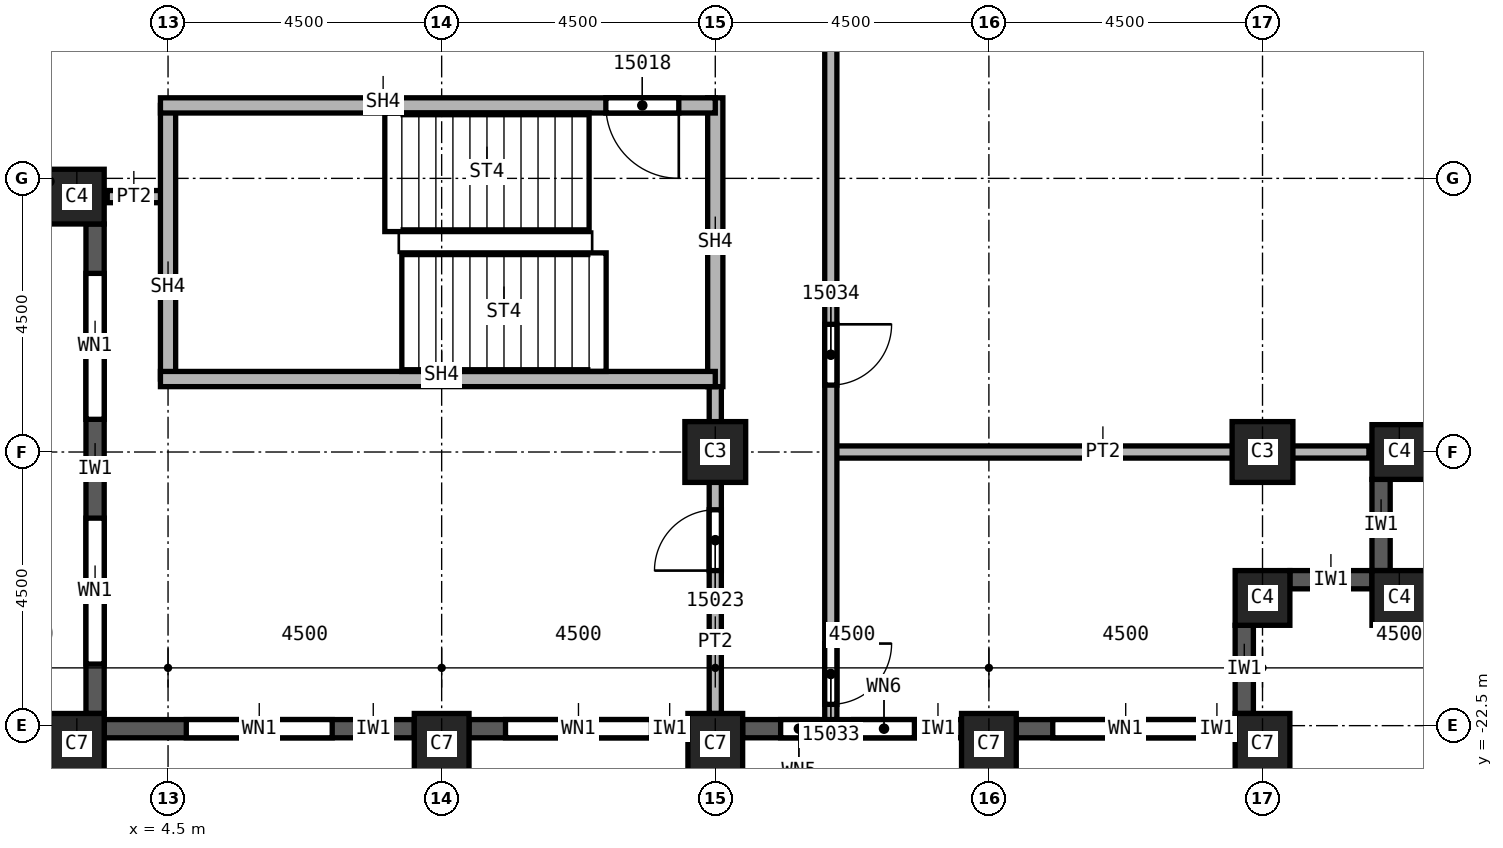
"""IFC4 building model, lengths in metres.
Left out: names, types, materials, properties, quantities, classifications, styles, units other than length and angle.
Written with IfcOpenShell. Run it as: python <this file> out.ifc"""

import sys

from ifc_helpers import new_model, si_unit, direction, frame, frame_2d, origin, origin_2d, place, context, subcontext, project, spatial, rectangle, extrude, element, fill, save


model = new_model("IFC4")
c1 = context("Model", 3, precision=1e-05, world=origin(), true_north=direction((0.0, 1.0)))
c2 = subcontext(c1, "Body", "Model", "MODEL_VIEW")
j1 = project(units=[si_unit("LENGTHUNIT", "METRE"), si_unit("PLANEANGLEUNIT", "RADIAN")], contexts=[c1])
p1 = place(None, origin())
s1 = spatial("IfcSite", under=j1, at=p1, CompositionType="ELEMENT")
p2 = place(p1, origin())
s2 = spatial("IfcBuilding", under=s1, at=p2, CompositionType="ELEMENT")
p3 = place(p2, frame((0.0, 0.0, 228.0)))
s3 = spatial("IfcBuildingStorey", under=s2, at=p3, CompositionType="ELEMENT", Elevation=228.0)
for number, where, z_axis, x_axis in (
    (1, (13.5, -18.0, 0.0), (0.0, 0.0, 1.0), (1.0, 0.0, 0.0)),
    (2, (22.5, -18.0, 0.0), (0.0, 0.0, 1.0), (1.0, 0.0, 0.0)),
):
    element("IfcColumn", number, at=place(p3, frame(where, z_axis=z_axis, x_axis=x_axis)), inside=s3, PredefinedType="COLUMN", context=c2, shape_type="SweptSolid", body=[
        extrude(rectangle(XDim=1.0, YDim=1.0, at=origin_2d()), origin(), (0.0, 0.0, 1.0), 3.72),
    ])
for number, where, z_axis, x_axis in (
    (3, (3.0, -22.8, 0.0), (0.0, 0.0, 1.0), (1.0, 0.0, 0.0)),
    (4, (9.0, -22.8, 0.0), (0.0, 0.0, 1.0), (1.0, 0.0, 0.0)),
    (5, (13.5, -22.8, 0.0), (0.0, 0.0, 1.0), (1.0, 0.0, 0.0)),
    (6, (18.0, -22.8, 0.0), (0.0, 0.0, 1.0), (1.0, 0.0, 0.0)),
    (7, (22.5, -22.8, 0.0), (0.0, 0.0, 1.0), (1.0, 0.0, 0.0)),
):
    element("IfcColumn", number, at=place(p3, frame(where, z_axis=z_axis, x_axis=x_axis)), inside=s3, PredefinedType="COLUMN", context=c2, shape_type="SweptSolid", body=[
        extrude(rectangle(XDim=0.9, YDim=1.0, at=origin_2d()), origin(), (0.0, 0.0, 1.0), 3.72),
    ])
for number, where, z_axis, x_axis in (
    (8, (3.0, -13.8, 0.0), (0.0, 0.0, 1.0), (1.0, 0.0, 0.0)),
    (9, (22.5, -20.4, 0.0), (0.0, 0.0, 1.0), (1.0, 0.0, 0.0)),
    (10, (24.75, -20.4, 0.0), (0.0, 0.0, 1.0), (1.0, 0.0, 0.0)),
    (11, (24.75, -18.0, 0.0), (0.0, 0.0, 1.0), (1.0, 0.0, 0.0)),
):
    element("IfcColumn", number, at=place(p3, frame(where, z_axis=z_axis, x_axis=x_axis)), inside=s3, PredefinedType="COLUMN", context=c2, shape_type="SweptSolid", body=[
        extrude(rectangle(XDim=0.9, YDim=0.9, at=origin_2d()), origin(), (0.0, 0.0, 1.0), 3.72),
    ])
p4 = place(p3, frame((3.3, -14.25, 0.0), z_axis=(0.0, 0.0, 1.0), x_axis=(0.0, -1.0, 0.0)))
e12 = element("IfcWall", 12, at=p4, inside=s3, PredefinedType="SOLIDWALL", context=c2, shape_type="SweptSolid", body=[
    extrude(rectangle(XDim=8.05, YDim=0.3, at=frame_2d((4.025, 0.0))), origin(), (0.0, 0.0, 1.0), 3.12),
])
p5 = place(p4, frame((0.812, 0.0, 0.8)))
e13 = element("IfcOpeningElement", 13, at=p5, cuts=e12, PredefinedType="OPENING", context=c2, shape_type="SweptSolid", body=[
    extrude(rectangle(XDim=2.4, YDim=1.95, at=frame_2d((1.2, 0.975))), frame((0.0, 0.15, 0.0), z_axis=(0.0, -1.0, 0.0), x_axis=(1.0, 0.0, 0.0)), (0.0, 0.0, 1.0), 0.3),
])
p6 = place(p4, frame((4.837, 0.0, 0.8)))
e14 = element("IfcOpeningElement", 14, at=p6, cuts=e12, PredefinedType="OPENING", context=c2, shape_type="SweptSolid", body=[
    extrude(rectangle(XDim=2.4, YDim=1.95, at=frame_2d((1.2, 0.975))), frame((0.0, 0.15, 0.0), z_axis=(0.0, -1.0, 0.0), x_axis=(1.0, 0.0, 0.0)), (0.0, 0.0, 1.0), 0.3),
])
p7 = place(p3, frame((3.45, -22.55, 0.0), z_axis=(0.0, 0.0, 1.0), x_axis=(1.0, 0.0, 0.0)))
e15 = element("IfcWall", 15, at=p7, inside=s3, PredefinedType="SOLIDWALL", context=c2, shape_type="SweptSolid", body=[
    extrude(rectangle(XDim=5.1, YDim=0.3, at=frame_2d((2.55, 0.0))), origin(), (0.0, 0.0, 1.0), 3.12),
])
p8 = place(p7, frame((1.35, 0.0, 0.8)))
e16 = element("IfcOpeningElement", 16, at=p8, cuts=e15, PredefinedType="OPENING", context=c2, shape_type="SweptSolid", body=[
    extrude(rectangle(XDim=2.4, YDim=1.95, at=frame_2d((1.2, 0.975))), frame((0.0, 0.15, 0.0), z_axis=(0.0, -1.0, 0.0), x_axis=(1.0, 0.0, 0.0)), (0.0, 0.0, 1.0), 0.3),
])
p9 = place(p3, frame((9.45, -22.55, 0.0), z_axis=(0.0, 0.0, 1.0), x_axis=(1.0, 0.0, 0.0)))
e17 = element("IfcWall", 17, at=p9, inside=s3, PredefinedType="SOLIDWALL", context=c2, shape_type="SweptSolid", body=[
    extrude(rectangle(XDim=3.6, YDim=0.3, at=frame_2d((1.8, 0.0))), origin(), (0.0, 0.0, 1.0), 3.12),
])
p10 = place(p9, frame((0.6, 0.0, 0.8)))
e18 = element("IfcOpeningElement", 18, at=p10, cuts=e17, PredefinedType="OPENING", context=c2, shape_type="SweptSolid", body=[
    extrude(rectangle(XDim=2.4, YDim=1.95, at=frame_2d((1.2, 0.975))), frame((0.0, 0.15, 0.0), z_axis=(0.0, -1.0, 0.0), x_axis=(1.0, 0.0, 0.0)), (0.0, 0.0, 1.0), 0.3),
])
p11 = place(p3, frame((13.95, -22.55, 0.0), z_axis=(0.0, 0.0, 1.0), x_axis=(1.0, 0.0, 0.0)))
e19 = element("IfcWall", 19, at=p11, inside=s3, PredefinedType="SOLIDWALL", context=c2, shape_type="SweptSolid", body=[
    extrude(rectangle(XDim=3.6, YDim=0.3, at=frame_2d((1.8, 0.0))), origin(), (0.0, 0.0, 1.0), 3.12),
])
p12 = place(p11, frame((0.625, 0.0, 0.8)))
e20 = element("IfcOpeningElement", 20, at=p12, cuts=e19, PredefinedType="OPENING", context=c2, shape_type="SweptSolid", body=[
    extrude(rectangle(XDim=0.6, YDim=1.95, at=frame_2d((0.3, 0.975))), frame((0.0, 0.15, 0.0), z_axis=(0.0, -1.0, 0.0), x_axis=(1.0, 0.0, 0.0)), (0.0, 0.0, 1.0), 0.3),
])
p13 = place(p11, frame((1.825, 0.0, 0.8)))
e21 = element("IfcOpeningElement", 21, at=p13, cuts=e19, PredefinedType="OPENING", context=c2, shape_type="SweptSolid", body=[
    extrude(rectangle(XDim=1.0, YDim=1.95, at=frame_2d((0.5, 0.975))), frame((0.0, 0.15, 0.0), z_axis=(0.0, -1.0, 0.0), x_axis=(1.0, 0.0, 0.0)), (0.0, 0.0, 1.0), 0.3),
])
p14 = place(p3, frame((18.45, -22.55, 0.0), z_axis=(0.0, 0.0, 1.0), x_axis=(1.0, 0.0, 0.0)))
e22 = element("IfcWall", 22, at=p14, inside=s3, PredefinedType="SOLIDWALL", context=c2, shape_type="SweptSolid", body=[
    extrude(rectangle(XDim=3.6, YDim=0.3, at=frame_2d((1.8, 0.0))), origin(), (0.0, 0.0, 1.0), 3.12),
])
p15 = place(p14, frame((0.6, 0.0, 0.8)))
e23 = element("IfcOpeningElement", 23, at=p15, cuts=e22, PredefinedType="OPENING", context=c2, shape_type="SweptSolid", body=[
    extrude(rectangle(XDim=2.4, YDim=1.95, at=frame_2d((1.2, 0.975))), frame((0.0, 0.15, 0.0), z_axis=(0.0, -1.0, 0.0), x_axis=(1.0, 0.0, 0.0)), (0.0, 0.0, 1.0), 0.3),
])
p16 = place(p3, frame((22.2, -22.3, 0.0), z_axis=(0.0, 0.0, 1.0), x_axis=(0.0, 1.0, 0.0)))
e24 = element("IfcWall", 24, at=p16, inside=s3, PredefinedType="SOLIDWALL", context=c2, shape_type="SweptSolid", body=[
    extrude(rectangle(XDim=1.45, YDim=0.3, at=frame_2d((0.725, 0.0))), origin(), (0.0, 0.0, 1.0), 3.12),
])
p17 = place(p3, frame((22.95, -20.1, 0.0), z_axis=(0.0, 0.0, 1.0), x_axis=(1.0, 0.0, 0.0)))
e25 = element("IfcWall", 25, at=p17, inside=s3, PredefinedType="SOLIDWALL", context=c2, shape_type="SweptSolid", body=[
    extrude(rectangle(XDim=1.35, YDim=0.3, at=frame_2d((0.675, 0.0))), origin(), (0.0, 0.0, 1.0), 3.12),
])
p18 = place(p3, frame((24.45, -19.95, 0.0), z_axis=(0.0, 0.0, 1.0), x_axis=(0.0, 1.0, 0.0)))
e26 = element("IfcWall", 26, at=p18, inside=s3, PredefinedType="SOLIDWALL", context=c2, shape_type="SweptSolid", body=[
    extrude(rectangle(XDim=1.5, YDim=0.3, at=frame_2d((0.75, 0.0))), origin(), (0.0, 0.0, 1.0), 3.12),
])
p19 = place(p3, frame((4.5, -13.8, 0.0), z_axis=(0.0, 0.0, 1.0), x_axis=(-1.0, 0.0, 0.0)))
e27 = element("IfcWall", 27, at=p19, inside=s3, PredefinedType="PARTITIONING", context=c2, shape_type="SweptSolid", body=[
    extrude(rectangle(XDim=1.0, YDim=0.2, at=frame_2d((0.5, 0.0))), origin(), (0.0, 0.0, 1.0), 3.72),
])
p20 = place(p3, frame((13.5, -22.3, 0.0), z_axis=(0.0, 0.0, 1.0), x_axis=(0.0, 1.0, 0.0)))
e28 = element("IfcWall", 28, at=p20, inside=s3, PredefinedType="PARTITIONING", context=c2, shape_type="SweptSolid", body=[
    extrude(rectangle(XDim=5.625, YDim=0.2, at=frame_2d((2.812, 0.0))), origin(), (0.0, 0.0, 1.0), 3.72),
])
p21 = place(p20, frame((2.35, 0.0, 0.0)))
e29 = element("IfcOpeningElement", 29, at=p21, cuts=e28, PredefinedType="OPENING", context=c2, shape_type="SweptSolid", body=[
    extrude(rectangle(XDim=1.0, YDim=2.1, at=frame_2d((0.5, 1.05))), frame((0.0, 0.1, 0.0), z_axis=(0.0, -1.0, 0.0), x_axis=(1.0, 0.0, 0.0)), (0.0, 0.0, 1.0), 0.2),
])
p22 = place(p3, frame((15.4, -18.0, 0.0), z_axis=(0.0, 0.0, 1.0), x_axis=(1.0, 0.0, 0.0)))
e30 = element("IfcWall", 30, at=p22, inside=s3, PredefinedType="PARTITIONING", context=c2, shape_type="SweptSolid", body=[
    extrude(rectangle(XDim=8.85, YDim=0.2, at=frame_2d((4.425, 0.0))), origin(), (0.0, 0.0, 1.0), 3.72),
])
p23 = place(p3, frame((15.4, 22.4, 0.0), z_axis=(0.0, 0.0, 1.0), x_axis=(0.0, -1.0, 0.0)))
e31 = element("IfcWall", 31, at=p23, inside=s3, PredefinedType="PARTITIONING", context=c2, shape_type="SweptSolid", body=[
    extrude(rectangle(XDim=44.8, YDim=0.2, at=frame_2d((22.4, 0.0))), origin(), (0.0, 0.0, 1.0), 3.72),
])
p24 = place(p23, frame((18.5, 0.0, 0.0)))
e32 = element("IfcOpeningElement", 32, at=p24, cuts=e31, PredefinedType="OPENING", context=c2, shape_type="SweptSolid", body=[
    extrude(rectangle(XDim=1.0, YDim=2.1, at=frame_2d((0.5, 1.05))), frame((0.0, 0.1, 0.0), z_axis=(0.0, -1.0, 0.0), x_axis=(1.0, 0.0, 0.0)), (0.0, 0.0, 1.0), 0.2),
])
p25 = place(p23, frame((9.95, 0.0, 0.0)))
e33 = element("IfcOpeningElement", 33, at=p25, cuts=e31, PredefinedType="OPENING", context=c2, shape_type="SweptSolid", body=[
    extrude(rectangle(XDim=1.0, YDim=2.1, at=frame_2d((0.5, 1.05))), frame((0.0, 0.1, 0.0), z_axis=(0.0, -1.0, 0.0), x_axis=(1.0, 0.0, 0.0)), (0.0, 0.0, 1.0), 0.2),
])
p26 = place(p23, frame((1.3, 0.0, 0.0)))
e34 = element("IfcOpeningElement", 34, at=p26, cuts=e31, PredefinedType="OPENING", context=c2, shape_type="SweptSolid", body=[
    extrude(rectangle(XDim=1.0, YDim=2.1, at=frame_2d((0.5, 1.05))), frame((0.0, 0.1, 0.0), z_axis=(0.0, -1.0, 0.0), x_axis=(1.0, 0.0, 0.0)), (0.0, 0.0, 1.0), 0.2),
])
p27 = place(p23, frame((43.55, 0.0, 0.0)))
e35 = element("IfcOpeningElement", 35, at=p27, cuts=e31, PredefinedType="OPENING", context=c2, shape_type="SweptSolid", body=[
    extrude(rectangle(XDim=1.0, YDim=2.1, at=frame_2d((0.5, 1.05))), frame((0.0, 0.1, 0.0), z_axis=(0.0, -1.0, 0.0), x_axis=(1.0, 0.0, 0.0)), (0.0, 0.0, 1.0), 0.2),
])
p28 = place(p23, frame((38.3, 0.0, 0.0)))
e36 = element("IfcOpeningElement", 36, at=p28, cuts=e31, PredefinedType="OPENING", context=c2, shape_type="SweptSolid", body=[
    extrude(rectangle(XDim=1.0, YDim=2.1, at=frame_2d((0.5, 1.05))), frame((0.0, 0.1, 0.0), z_axis=(0.0, -1.0, 0.0), x_axis=(1.0, 0.0, 0.0)), (0.0, 0.0, 1.0), 0.2),
])
p29 = place(p23, frame((30.65, 0.0, 0.0)))
e37 = element("IfcOpeningElement", 37, at=p29, cuts=e31, PredefinedType="OPENING", context=c2, shape_type="SweptSolid", body=[
    extrude(rectangle(XDim=1.0, YDim=2.1, at=frame_2d((0.5, 1.05))), frame((0.0, 0.1, 0.0), z_axis=(0.0, -1.0, 0.0), x_axis=(1.0, 0.0, 0.0)), (0.0, 0.0, 1.0), 0.2),
])
p30 = place(p23, frame((24.2, 0.0, 0.0)))
e38 = element("IfcOpeningElement", 38, at=p30, cuts=e31, PredefinedType="OPENING", context=c2, shape_type="SweptSolid", body=[
    extrude(rectangle(XDim=1.0, YDim=2.1, at=frame_2d((0.5, 1.05))), frame((0.0, 0.1, 0.0), z_axis=(0.0, -1.0, 0.0), x_axis=(1.0, 0.0, 0.0)), (0.0, 0.0, 1.0), 0.2),
])
p31 = place(p3, frame((4.5, -16.8, 0.0), z_axis=(0.0, 0.0, 1.0), x_axis=(0.0, 1.0, 0.0)))
e39 = element("IfcWall", 39, at=p31, inside=s3, PredefinedType="SOLIDWALL", context=c2, shape_type="SweptSolid", body=[
    extrude(rectangle(XDim=4.5, YDim=0.25, at=frame_2d((2.25, 0.0))), origin(), (0.0, 0.0, 1.0), 3.72),
])
p32 = place(p3, frame((13.5, -16.925, 0.0), z_axis=(0.0, 0.0, 1.0), x_axis=(0.0, 1.0, 0.0)))
e40 = element("IfcWall", 40, at=p32, inside=s3, PredefinedType="SOLIDWALL", context=c2, shape_type="SweptSolid", body=[
    extrude(rectangle(XDim=4.75, YDim=0.25, at=frame_2d((2.375, 0.0))), origin(), (0.0, 0.0, 1.0), 3.72),
])
p33 = place(p3, frame((13.5, -16.8, 0.0), z_axis=(0.0, 0.0, 1.0), x_axis=(-1.0, 0.0, 0.0)))
e41 = element("IfcWall", 41, at=p33, inside=s3, PredefinedType="SOLIDWALL", context=c2, shape_type="SweptSolid", body=[
    extrude(rectangle(XDim=9.125, YDim=0.25, at=frame_2d((4.562, 0.0))), origin(), (0.0, 0.0, 1.0), 3.72),
])
p34 = place(p3, frame((13.5, -12.3, 0.0), z_axis=(0.0, 0.0, 1.0), x_axis=(-1.0, 0.0, 0.0)))
e42 = element("IfcWall", 42, at=p34, inside=s3, PredefinedType="SOLIDWALL", context=c2, shape_type="SweptSolid", body=[
    extrude(rectangle(XDim=9.125, YDim=0.25, at=frame_2d((4.562, 0.0))), origin(), (0.0, 0.0, 1.0), 3.72),
])
p35 = place(p34, frame((0.6, 0.0, 0.0)))
e43 = element("IfcOpeningElement", 43, at=p35, cuts=e42, PredefinedType="OPENING", context=c2, shape_type="SweptSolid", body=[
    extrude(rectangle(XDim=1.2, YDim=2.1, at=frame_2d((0.6, 1.05))), frame((0.0, 0.125, 0.0), z_axis=(0.0, -1.0, 0.0), x_axis=(1.0, 0.0, 0.0)), (0.0, 0.0, 1.0), 0.25),
])
p36 = place(p5, origin())
e44 = element("IfcWindow", 44, at=p36, inside=s3, PartitioningType="SINGLE_PANEL", PredefinedType="WINDOW", context=c2, shape_type="SweptSolid", body=[
    extrude(rectangle(XDim=2.4, YDim=1.95, at=frame_2d((1.2, 0.975))), frame((0.0, 0.03, 0.0), z_axis=(0.0, -1.0, 0.0), x_axis=(1.0, 0.0, 0.0)), (0.0, 0.0, 1.0), 0.06),
])
fill(e13, e44)
p37 = place(p6, origin())
e45 = element("IfcWindow", 45, at=p37, inside=s3, PartitioningType="SINGLE_PANEL", PredefinedType="WINDOW", context=c2, shape_type="SweptSolid", body=[
    extrude(rectangle(XDim=2.4, YDim=1.95, at=frame_2d((1.2, 0.975))), frame((0.0, 0.03, 0.0), z_axis=(0.0, -1.0, 0.0), x_axis=(1.0, 0.0, 0.0)), (0.0, 0.0, 1.0), 0.06),
])
fill(e14, e45)
p38 = place(p8, origin())
e46 = element("IfcWindow", 46, at=p38, inside=s3, PartitioningType="SINGLE_PANEL", PredefinedType="WINDOW", context=c2, shape_type="SweptSolid", body=[
    extrude(rectangle(XDim=2.4, YDim=1.95, at=frame_2d((1.2, 0.975))), frame((0.0, 0.03, 0.0), z_axis=(0.0, -1.0, 0.0), x_axis=(1.0, 0.0, 0.0)), (0.0, 0.0, 1.0), 0.06),
])
fill(e16, e46)
p39 = place(p10, origin())
e47 = element("IfcWindow", 47, at=p39, inside=s3, PartitioningType="SINGLE_PANEL", PredefinedType="WINDOW", context=c2, shape_type="SweptSolid", body=[
    extrude(rectangle(XDim=2.4, YDim=1.95, at=frame_2d((1.2, 0.975))), frame((0.0, 0.03, 0.0), z_axis=(0.0, -1.0, 0.0), x_axis=(1.0, 0.0, 0.0)), (0.0, 0.0, 1.0), 0.06),
])
fill(e18, e47)
p40 = place(p15, origin())
e48 = element("IfcWindow", 48, at=p40, inside=s3, PartitioningType="SINGLE_PANEL", PredefinedType="WINDOW", context=c2, shape_type="SweptSolid", body=[
    extrude(rectangle(XDim=2.4, YDim=1.95, at=frame_2d((1.2, 0.975))), frame((0.0, 0.03, 0.0), z_axis=(0.0, -1.0, 0.0), x_axis=(1.0, 0.0, 0.0)), (0.0, 0.0, 1.0), 0.06),
])
fill(e23, e48)
p41 = place(p35, origin())
e49 = element("IfcDoor", 49, at=p41, inside=s3, OperationType="SINGLE_SWING_LEFT", PredefinedType="DOOR", context=c2, shape_type="SweptSolid", body=[
    extrude(rectangle(XDim=1.2, YDim=2.1, at=frame_2d((0.6, 1.05))), frame((0.0, 0.025, 0.0), z_axis=(0.0, -1.0, 0.0), x_axis=(1.0, 0.0, 0.0)), (0.0, 0.0, 1.0), 0.05),
])
fill(e43, e49)
p42 = place(p21, origin())
e50 = element("IfcDoor", 50, at=p42, inside=s3, OperationType="SINGLE_SWING_RIGHT", PredefinedType="DOOR", context=c2, shape_type="SweptSolid", body=[
    extrude(rectangle(XDim=1.0, YDim=2.1, at=frame_2d((0.5, 1.05))), frame((0.0, 0.025, 0.0), z_axis=(0.0, -1.0, 0.0), x_axis=(1.0, 0.0, 0.0)), (0.0, 0.0, 1.0), 0.05),
])
fill(e29, e50)
p43 = place(p27, origin())
e51 = element("IfcDoor", 51, at=p43, inside=s3, OperationType="SINGLE_SWING_RIGHT", PredefinedType="DOOR", context=c2, shape_type="SweptSolid", body=[
    extrude(rectangle(XDim=1.0, YDim=2.1, at=frame_2d((0.5, 1.05))), frame((0.0, 0.025, 0.0), z_axis=(0.0, -1.0, 0.0), x_axis=(1.0, 0.0, 0.0)), (0.0, 0.0, 1.0), 0.05),
])
fill(e35, e51)
p44 = place(p28, origin())
e52 = element("IfcDoor", 52, at=p44, inside=s3, OperationType="SINGLE_SWING_LEFT", PredefinedType="DOOR", context=c2, shape_type="SweptSolid", body=[
    extrude(rectangle(XDim=1.0, YDim=2.1, at=frame_2d((0.5, 1.05))), frame((0.0, 0.025, 0.0), z_axis=(0.0, -1.0, 0.0), x_axis=(1.0, 0.0, 0.0)), (0.0, 0.0, 1.0), 0.05),
])
fill(e36, e52)
p45 = place(p12, origin())
e53 = element("IfcWindow", 53, at=p45, inside=s3, PartitioningType="SINGLE_PANEL", PredefinedType="WINDOW", context=c2, shape_type="SweptSolid", body=[
    extrude(rectangle(XDim=0.6, YDim=1.95, at=frame_2d((0.3, 0.975))), frame((0.0, 0.03, 0.0), z_axis=(0.0, -1.0, 0.0), x_axis=(1.0, 0.0, 0.0)), (0.0, 0.0, 1.0), 0.06),
])
fill(e20, e53)
p46 = place(p13, origin())
e54 = element("IfcWindow", 54, at=p46, inside=s3, PartitioningType="SINGLE_PANEL", PredefinedType="WINDOW", context=c2, shape_type="SweptSolid", body=[
    extrude(rectangle(XDim=1.0, YDim=1.95, at=frame_2d((0.5, 0.975))), frame((0.0, 0.03, 0.0), z_axis=(0.0, -1.0, 0.0), x_axis=(1.0, 0.0, 0.0)), (0.0, 0.0, 1.0), 0.06),
])
fill(e21, e54)
save(model, sys.argv[1])
